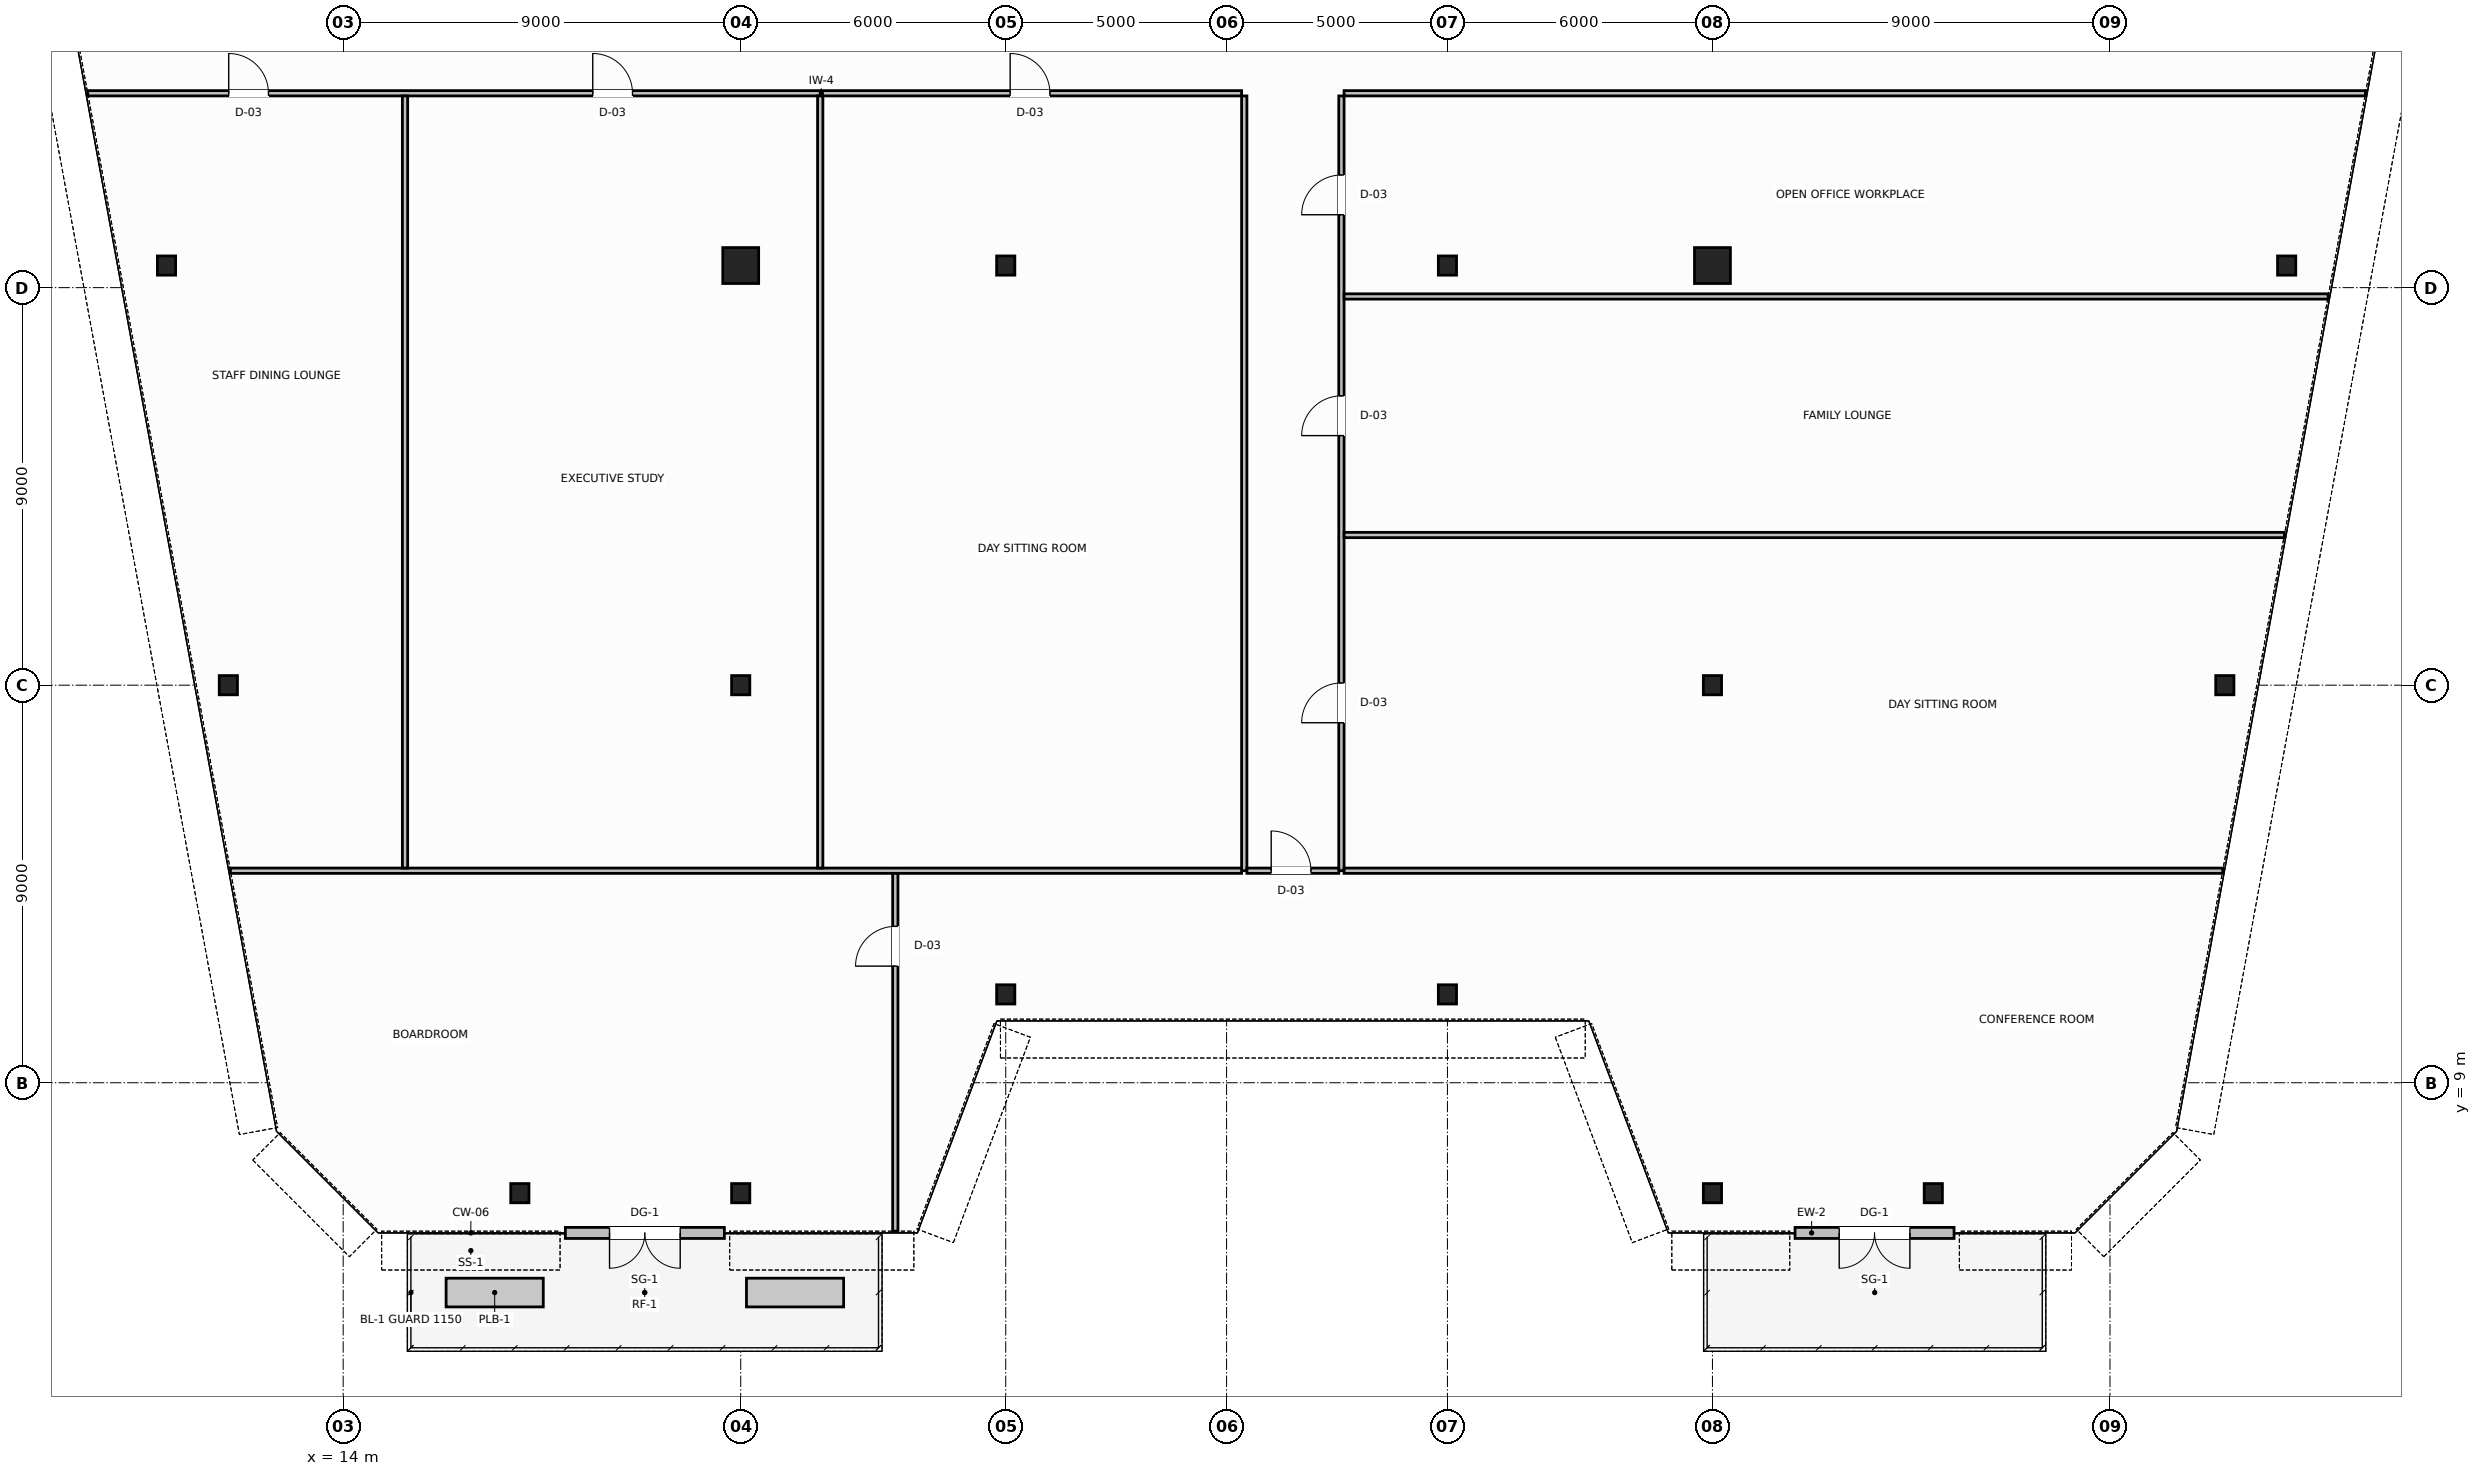
"""IFC4 building model, lengths in metres.
Left out: names, types, materials, properties, quantities, classifications, styles, units other than length and angle.
Written with IfcOpenShell. Run it as: python <this file> out.ifc"""

import sys

from ifc_helpers import new_model, si_unit, direction, frame, frame_2d, origin, origin_2d, place, context, subcontext, project, spatial, rectangle, hollow_circle, i_section, extrude, source, transform, mapped, element, fill, save


model = new_model("IFC4")
c1 = context("Model", 3, precision=1e-05, world=origin(), true_north=direction((0.0, 1.0)))
c2 = subcontext(c1, "Body", "Model", "MODEL_VIEW")
j1 = project(units=[si_unit("LENGTHUNIT", "METRE"), si_unit("PLANEANGLEUNIT", "RADIAN")], contexts=[c1])
p1 = place(None, origin())
s1 = spatial("IfcSite", under=j1, at=p1, CompositionType="ELEMENT")
p2 = place(p1, origin())
s2 = spatial("IfcBuilding", under=s1, at=p2, CompositionType="ELEMENT")
p3 = place(p2, frame((0.0, 0.0, 180.4)))
s3 = spatial("IfcBuildingStorey", under=s2, at=p3, CompositionType="ELEMENT", Elevation=180.4)
m1 = source(origin(), c2, "Body", "SweptSolid", [
    extrude(i_section(OverallWidth=0.412, OverallDepth=0.435, WebThickness=0.036, FlangeThickness=0.05, FilletRadius=0.015, at=origin_2d()), origin(), (0.0, 0.0, 1.0), 3.8),
])
for number, where, z_axis, x_axis in (
    (1, (10.0, 27.5, 0.0), (0.0, 0.0, 1.0), (1.0, 0.0, 0.0)),
    (2, (11.4, 18.0, 0.0), (0.0, 0.0, 1.0), (1.0, 0.0, 0.0)),
    (3, (58.0, 27.5, 0.0), (0.0, 0.0, 1.0), (1.0, 0.0, 0.0)),
    (4, (56.6, 18.0, 0.0), (0.0, 0.0, 1.0), (1.0, 0.0, 0.0)),
):
    element("IfcColumn", number, at=place(p3, frame(where, z_axis=z_axis, x_axis=x_axis)), inside=s3, PredefinedType="COLUMN", context=c2, shape_type="MappedRepresentation", body=[
        mapped(m1, transform((0.0, 0.0, 0.0), scale=1.0)),
    ])
m2 = source(origin(), c2, "Body", "SweptSolid", [
    extrude(hollow_circle(Radius=0.406, WallThickness=0.04, at=origin_2d()), origin(), (0.0, 0.0, 1.0), 3.8),
])
p4 = place(p3, frame((23.0, 27.5, 0.0), z_axis=(0.0, 0.0, 1.0), x_axis=(1.0, 0.0, 0.0)))
e5 = element("IfcColumn", 5, at=p4, inside=s3, PredefinedType="COLUMN", context=c2, shape_type="MappedRepresentation", body=[
    mapped(m2, transform((0.0, 0.0, 0.0), scale=1.0)),
])
m3 = source(origin(), c2, "Body", "SweptSolid", [
    extrude(i_section(OverallWidth=0.412, OverallDepth=0.435, WebThickness=0.036, FlangeThickness=0.05, FilletRadius=0.015, at=origin_2d()), origin(), (0.0, 0.0, 1.0), 3.8),
])
for number, where, z_axis, x_axis in (
    (6, (29.0, 27.5, 0.0), (0.0, 0.0, 1.0), (1.0, 0.0, 0.0)),
    (7, (39.0, 27.5, 0.0), (0.0, 0.0, 1.0), (1.0, 0.0, 0.0)),
):
    element("IfcColumn", number, at=place(p3, frame(where, z_axis=z_axis, x_axis=x_axis)), inside=s3, PredefinedType="COLUMN", context=c2, shape_type="MappedRepresentation", body=[
        mapped(m3, transform((0.0, 0.0, 0.0), scale=1.0)),
    ])
p5 = place(p3, frame((45.0, 27.5, 0.0), z_axis=(0.0, 0.0, 1.0), x_axis=(1.0, 0.0, 0.0)))
e8 = element("IfcColumn", 8, at=p5, inside=s3, PredefinedType="COLUMN", context=c2, shape_type="MappedRepresentation", body=[
    mapped(m2, transform((0.0, 0.0, 0.0), scale=1.0)),
])
for number, where, z_axis, x_axis in (
    (9, (23.0, 18.0, 0.0), (0.0, 0.0, 1.0), (1.0, 0.0, 0.0)),
    (10, (45.0, 18.0, 0.0), (0.0, 0.0, 1.0), (1.0, 0.0, 0.0)),
):
    element("IfcColumn", number, at=place(p3, frame(where, z_axis=z_axis, x_axis=x_axis)), inside=s3, PredefinedType="COLUMN", context=c2, shape_type="MappedRepresentation", body=[
        mapped(m3, transform((0.0, 0.0, 0.0), scale=1.0)),
    ])
m4 = source(origin(), c2, "Body", "SweptSolid", [
    extrude(i_section(OverallWidth=0.412, OverallDepth=0.435, WebThickness=0.036, FlangeThickness=0.05, FilletRadius=0.015, at=origin_2d()), origin(), (0.0, 0.0, 1.0), 4.02),
])
for number, where, z_axis, x_axis in (
    (11, (18.0, 6.5, -0.22), (0.0, 0.0, 1.0), (1.0, 0.0, 0.0)),
    (12, (23.0, 6.5, -0.22), (0.0, 0.0, 1.0), (1.0, 0.0, 0.0)),
    (13, (29.0, 11.0, -0.22), (0.0, 0.0, 1.0), (1.0, 0.0, 0.0)),
    (14, (39.0, 11.0, -0.22), (0.0, 0.0, 1.0), (1.0, 0.0, 0.0)),
    (15, (45.0, 6.5, -0.22), (0.0, 0.0, 1.0), (1.0, 0.0, 0.0)),
    (16, (50.0, 6.5, -0.22), (0.0, 0.0, 1.0), (1.0, 0.0, 0.0)),
):
    element("IfcColumn", number, at=place(p3, frame(where, z_axis=z_axis, x_axis=x_axis)), inside=s3, PredefinedType="COLUMN", context=c2, shape_type="MappedRepresentation", body=[
        mapped(m4, transform((0.0, 0.0, 0.0), scale=1.0)),
    ])
p6 = place(p3, frame((22.63, 5.6, 0.0), z_axis=(0.0, 0.0, 1.0), x_axis=(-1.0, 0.0, 0.0)))
e17 = element("IfcWall", 17, at=p6, inside=s3, PredefinedType="STANDARD", context=c2, shape_type="SweptSolid", body=[
    extrude(rectangle(XDim=3.6, YDim=0.25, at=frame_2d((1.8, 0.0))), origin(), (0.0, 0.0, 1.0), 3.58),
])
p7 = place(p6, frame((1.0, 0.0, 0.0)))
e18 = element("IfcOpeningElement", 18, at=p7, cuts=e17, PredefinedType="OPENING", context=c2, shape_type="SweptSolid", body=[
    extrude(rectangle(XDim=1.6, YDim=2.3, at=frame_2d((0.8, 1.15))), frame((0.0, 0.135, 0.0), z_axis=(0.0, -1.0, 0.0), x_axis=(1.0, 0.0, 0.0)), (0.0, 0.0, 1.0), 0.27),
])
p8 = place(p3, frame((16.33, 4.25, 0.0), z_axis=(0.0, 0.0, 1.0), x_axis=(1.0, 0.0, 0.0)))
e19 = element("IfcWall", 19, at=p8, inside=s3, PredefinedType="PARAPET", context=c2, shape_type="SweptSolid", body=[
    extrude(rectangle(XDim=2.2, YDim=0.65, at=frame_2d((1.1, 0.0))), origin(), (0.0, 0.0, 1.0), 0.65),
])
p9 = place(p3, frame((23.13, 4.25, 0.0), z_axis=(0.0, 0.0, 1.0), x_axis=(1.0, 0.0, 0.0)))
e20 = element("IfcWall", 20, at=p9, inside=s3, PredefinedType="PARAPET", context=c2, shape_type="SweptSolid", body=[
    extrude(rectangle(XDim=2.2, YDim=0.65, at=frame_2d((1.1, 0.0))), origin(), (0.0, 0.0, 1.0), 0.65),
])
p10 = place(p3, frame((50.47, 5.6, 0.0), z_axis=(0.0, 0.0, 1.0), x_axis=(-1.0, 0.0, 0.0)))
e21 = element("IfcWall", 21, at=p10, inside=s3, PredefinedType="STANDARD", context=c2, shape_type="SweptSolid", body=[
    extrude(rectangle(XDim=3.6, YDim=0.25, at=frame_2d((1.8, 0.0))), origin(), (0.0, 0.0, 1.0), 3.58),
])
p11 = place(p10, frame((1.0, 0.0, 0.0)))
e22 = element("IfcOpeningElement", 22, at=p11, cuts=e21, PredefinedType="OPENING", context=c2, shape_type="SweptSolid", body=[
    extrude(rectangle(XDim=1.6, YDim=2.3, at=frame_2d((0.8, 1.15))), frame((0.0, 0.135, 0.0), z_axis=(0.0, -1.0, 0.0), x_axis=(1.0, 0.0, 0.0)), (0.0, 0.0, 1.0), 0.27),
])
p12 = place(p3, frame((8.216, 31.4, 0.0), z_axis=(0.0, 0.0, 1.0), x_axis=(1.0, 0.0, 0.0)))
e23 = element("IfcWall", 23, at=p12, inside=s3, PredefinedType="PARTITIONING", context=c2, shape_type="SweptSolid", body=[
    extrude(rectangle(XDim=26.124, YDim=0.12, at=frame_2d((13.062, 0.0))), origin(), (0.0, 0.0, 1.0), 3.58),
])
p13 = place(p12, frame((3.192, 0.0, 0.0)))
e24 = element("IfcOpeningElement", 24, at=p13, cuts=e23, PredefinedType="OPENING", context=c2, shape_type="SweptSolid", body=[
    extrude(rectangle(XDim=0.9, YDim=2.15, at=frame_2d((0.45, 1.075))), frame((0.0, 0.07, 0.0), z_axis=(0.0, -1.0, 0.0), x_axis=(1.0, 0.0, 0.0)), (0.0, 0.0, 1.0), 0.14),
])
p14 = place(p12, frame((11.434, 0.0, 0.0)))
e25 = element("IfcOpeningElement", 25, at=p14, cuts=e23, PredefinedType="OPENING", context=c2, shape_type="SweptSolid", body=[
    extrude(rectangle(XDim=0.9, YDim=2.15, at=frame_2d((0.45, 1.075))), frame((0.0, 0.07, 0.0), z_axis=(0.0, -1.0, 0.0), x_axis=(1.0, 0.0, 0.0)), (0.0, 0.0, 1.0), 0.14),
])
p15 = place(p12, frame((20.884, 0.0, 0.0)))
e26 = element("IfcOpeningElement", 26, at=p15, cuts=e23, PredefinedType="OPENING", context=c2, shape_type="SweptSolid", body=[
    extrude(rectangle(XDim=0.9, YDim=2.15, at=frame_2d((0.45, 1.075))), frame((0.0, 0.07, 0.0), z_axis=(0.0, -1.0, 0.0), x_axis=(1.0, 0.0, 0.0)), (0.0, 0.0, 1.0), 0.14),
])
p16 = place(p3, frame((36.66, 31.4, 0.0), z_axis=(0.0, 0.0, 1.0), x_axis=(1.0, 0.0, 0.0)))
e27 = element("IfcWall", 27, at=p16, inside=s3, PredefinedType="PARTITIONING", context=c2, shape_type="SweptSolid", body=[
    extrude(rectangle(XDim=23.124, YDim=0.12, at=frame_2d((11.562, 0.0))), origin(), (0.0, 0.0, 1.0), 3.58),
])
p17 = place(p3, frame((34.4, 13.8, 0.0), z_axis=(0.0, 0.0, 1.0), x_axis=(0.0, 1.0, 0.0)))
e28 = element("IfcWall", 28, at=p17, inside=s3, PredefinedType="PARTITIONING", context=c2, shape_type="SweptSolid", body=[
    extrude(rectangle(XDim=17.54, YDim=0.12, at=frame_2d((8.77, 0.0))), origin(), (0.0, 0.0, 1.0), 3.58),
])
p18 = place(p3, frame((36.6, 13.8, 0.0), z_axis=(0.0, 0.0, 1.0), x_axis=(0.0, 1.0, 0.0)))
e29 = element("IfcWall", 29, at=p18, inside=s3, PredefinedType="PARTITIONING", context=c2, shape_type="SweptSolid", body=[
    extrude(rectangle(XDim=17.54, YDim=0.12, at=frame_2d((8.77, 0.0))), origin(), (0.0, 0.0, 1.0), 3.58),
])
p19 = place(p18, frame((3.35, 0.0, 0.0)))
e30 = element("IfcOpeningElement", 30, at=p19, cuts=e29, PredefinedType="OPENING", context=c2, shape_type="SweptSolid", body=[
    extrude(rectangle(XDim=0.9, YDim=2.15, at=frame_2d((0.45, 1.075))), frame((0.0, 0.07, 0.0), z_axis=(0.0, -1.0, 0.0), x_axis=(1.0, 0.0, 0.0)), (0.0, 0.0, 1.0), 0.14),
])
p20 = place(p18, frame((9.85, 0.0, 0.0)))
e31 = element("IfcOpeningElement", 31, at=p20, cuts=e29, PredefinedType="OPENING", context=c2, shape_type="SweptSolid", body=[
    extrude(rectangle(XDim=0.9, YDim=2.15, at=frame_2d((0.45, 1.075))), frame((0.0, 0.07, 0.0), z_axis=(0.0, -1.0, 0.0), x_axis=(1.0, 0.0, 0.0)), (0.0, 0.0, 1.0), 0.14),
])
p21 = place(p18, frame((14.85, 0.0, 0.0)))
e32 = element("IfcOpeningElement", 32, at=p21, cuts=e29, PredefinedType="OPENING", context=c2, shape_type="SweptSolid", body=[
    extrude(rectangle(XDim=0.9, YDim=2.15, at=frame_2d((0.45, 1.075))), frame((0.0, 0.07, 0.0), z_axis=(0.0, -1.0, 0.0), x_axis=(1.0, 0.0, 0.0)), (0.0, 0.0, 1.0), 0.14),
])
p22 = place(p3, frame((34.46, 13.8, 0.0), z_axis=(0.0, 0.0, 1.0), x_axis=(1.0, 0.0, 0.0)))
e33 = element("IfcWall", 33, at=p22, inside=s3, PredefinedType="PARTITIONING", context=c2, shape_type="SweptSolid", body=[
    extrude(rectangle(XDim=2.08, YDim=0.12, at=frame_2d((1.04, 0.0))), origin(), (0.0, 0.0, 1.0), 3.58),
])
p23 = place(p22, frame((0.55, 0.0, 0.0)))
e34 = element("IfcOpeningElement", 34, at=p23, cuts=e33, PredefinedType="OPENING", context=c2, shape_type="SweptSolid", body=[
    extrude(rectangle(XDim=0.9, YDim=2.15, at=frame_2d((0.45, 1.075))), frame((0.0, 0.07, 0.0), z_axis=(0.0, -1.0, 0.0), x_axis=(1.0, 0.0, 0.0)), (0.0, 0.0, 1.0), 0.14),
])
p24 = place(p3, frame((11.448, 13.8, 0.0), z_axis=(0.0, 0.0, 1.0), x_axis=(1.0, 0.0, 0.0)))
e35 = element("IfcWall", 35, at=p24, inside=s3, PredefinedType="PARTITIONING", context=c2, shape_type="SweptSolid", body=[
    extrude(rectangle(XDim=22.892, YDim=0.12, at=frame_2d((11.446, 0.0))), origin(), (0.0, 0.0, 1.0), 3.58),
])
p25 = place(p3, frame((36.66, 13.8, 0.0), z_axis=(0.0, 0.0, 1.0), x_axis=(1.0, 0.0, 0.0)))
e36 = element("IfcWall", 36, at=p25, inside=s3, PredefinedType="PARTITIONING", context=c2, shape_type="SweptSolid", body=[
    extrude(rectangle(XDim=19.892, YDim=0.12, at=frame_2d((9.946, 0.0))), origin(), (0.0, 0.0, 1.0), 3.58),
])
p26 = place(p3, frame((26.5, 5.64, 0.0), z_axis=(0.0, 0.0, 1.0), x_axis=(0.0, 1.0, 0.0)))
e37 = element("IfcWall", 37, at=p26, inside=s3, PredefinedType="PARTITIONING", context=c2, shape_type="SweptSolid", body=[
    extrude(rectangle(XDim=8.1, YDim=0.12, at=frame_2d((4.05, 0.0))), origin(), (0.0, 0.0, 1.0), 3.58),
])
p27 = place(p26, frame((6.0, 0.0, 0.0)))
e38 = element("IfcOpeningElement", 38, at=p27, cuts=e37, PredefinedType="OPENING", context=c2, shape_type="SweptSolid", body=[
    extrude(rectangle(XDim=0.9, YDim=2.15, at=frame_2d((0.45, 1.075))), frame((0.0, 0.07, 0.0), z_axis=(0.0, -1.0, 0.0), x_axis=(1.0, 0.0, 0.0)), (0.0, 0.0, 1.0), 0.14),
])
for number, where, z_axis, x_axis in (
    (39, (15.4, 13.86, 0.0), (0.0, 0.0, 1.0), (0.0, 1.0, 0.0)),
    (40, (24.8, 13.86, 0.0), (0.0, 0.0, 1.0), (0.0, 1.0, 0.0)),
):
    element("IfcWall", number, at=place(p3, frame(where, z_axis=z_axis, x_axis=x_axis)), inside=s3, PredefinedType="PARTITIONING", context=c2, shape_type="SweptSolid", body=[
        extrude(rectangle(XDim=17.48, YDim=0.12, at=frame_2d((8.74, 0.0))), origin(), (0.0, 0.0, 1.0), 3.58),
    ])
p28 = place(p3, frame((36.66, 21.4, 0.0), z_axis=(0.0, 0.0, 1.0), x_axis=(1.0, 0.0, 0.0)))
e41 = element("IfcWall", 41, at=p28, inside=s3, PredefinedType="PARTITIONING", context=c2, shape_type="SweptSolid", body=[
    extrude(rectangle(XDim=21.288, YDim=0.12, at=frame_2d((10.644, 0.0))), origin(), (0.0, 0.0, 1.0), 3.12),
])
p29 = place(p3, frame((36.66, 26.8, 0.0), z_axis=(0.0, 0.0, 1.0), x_axis=(1.0, 0.0, 0.0)))
e42 = element("IfcWall", 42, at=p29, inside=s3, PredefinedType="PARTITIONING", context=c2, shape_type="SweptSolid", body=[
    extrude(rectangle(XDim=22.279, YDim=0.12, at=frame_2d((11.14, 0.0))), origin(), (0.0, 0.0, 1.0), 3.58),
])
m5 = source(origin(), c2, "Body", "SweptSolid", [
    extrude(rectangle(XDim=1.6, YDim=2.3, at=frame_2d((0.8, 1.15))), frame((0.0, 0.025, 0.0), z_axis=(0.0, -1.0, 0.0), x_axis=(1.0, 0.0, 0.0)), (0.0, 0.0, 1.0), 0.05),
])
p30 = place(p7, origin())
e43 = element("IfcDoor", 43, at=p30, inside=s3, OperationType="DOUBLE_DOOR_SINGLE_SWING", PredefinedType="DOOR", context=c2, shape_type="MappedRepresentation", body=[
    mapped(m5, transform((0.0, 0.0, 0.0), scale=1.0)),
])
fill(e18, e43)
p31 = place(p11, origin())
e44 = element("IfcDoor", 44, at=p31, inside=s3, OperationType="DOUBLE_DOOR_SINGLE_SWING", PredefinedType="DOOR", context=c2, shape_type="MappedRepresentation", body=[
    mapped(m5, transform((0.0, 0.0, 0.0), scale=1.0)),
])
fill(e22, e44)
m6 = source(origin(), c2, "Body", "SweptSolid", [
    extrude(rectangle(XDim=0.9, YDim=2.15, at=frame_2d((0.45, 1.075))), frame((0.0, 0.025, 0.0), z_axis=(0.0, -1.0, 0.0), x_axis=(1.0, 0.0, 0.0)), (0.0, 0.0, 1.0), 0.05),
])
p32 = place(p27, origin())
e45 = element("IfcDoor", 45, at=p32, inside=s3, OperationType="SINGLE_SWING_RIGHT", PredefinedType="DOOR", context=c2, shape_type="MappedRepresentation", body=[
    mapped(m6, transform((0.0, 0.0, 0.0), scale=1.0)),
])
fill(e38, e45)
p33 = place(p23, origin())
e46 = element("IfcDoor", 46, at=p33, inside=s3, OperationType="SINGLE_SWING_LEFT", PredefinedType="DOOR", context=c2, shape_type="MappedRepresentation", body=[
    mapped(m6, transform((0.0, 0.0, 0.0), scale=1.0)),
])
fill(e34, e46)
p34 = place(p13, origin())
e47 = element("IfcDoor", 47, at=p34, inside=s3, OperationType="SINGLE_SWING_LEFT", PredefinedType="DOOR", context=c2, shape_type="MappedRepresentation", body=[
    mapped(m6, transform((0.0, 0.0, 0.0), scale=1.0)),
])
fill(e24, e47)
p35 = place(p14, origin())
e48 = element("IfcDoor", 48, at=p35, inside=s3, OperationType="SINGLE_SWING_RIGHT", PredefinedType="DOOR", context=c2, shape_type="MappedRepresentation", body=[
    mapped(m6, transform((0.0, 0.0, 0.0), scale=1.0)),
])
fill(e25, e48)
p36 = place(p15, origin())
e49 = element("IfcDoor", 49, at=p36, inside=s3, OperationType="SINGLE_SWING_LEFT", PredefinedType="DOOR", context=c2, shape_type="MappedRepresentation", body=[
    mapped(m6, transform((0.0, 0.0, 0.0), scale=1.0)),
])
fill(e26, e49)
p37 = place(p19, origin())
e50 = element("IfcDoor", 50, at=p37, inside=s3, OperationType="SINGLE_SWING_RIGHT", PredefinedType="DOOR", context=c2, shape_type="MappedRepresentation", body=[
    mapped(m6, transform((0.0, 0.0, 0.0), scale=1.0)),
])
fill(e30, e50)
p38 = place(p20, origin())
e51 = element("IfcDoor", 51, at=p38, inside=s3, OperationType="SINGLE_SWING_LEFT", PredefinedType="DOOR", context=c2, shape_type="MappedRepresentation", body=[
    mapped(m6, transform((0.0, 0.0, 0.0), scale=1.0)),
])
fill(e31, e51)
p39 = place(p21, origin())
e52 = element("IfcDoor", 52, at=p39, inside=s3, OperationType="SINGLE_SWING_RIGHT", PredefinedType="DOOR", context=c2, shape_type="MappedRepresentation", body=[
    mapped(m6, transform((0.0, 0.0, 0.0), scale=1.0)),
])
fill(e32, e52)
save(model, sys.argv[1])
